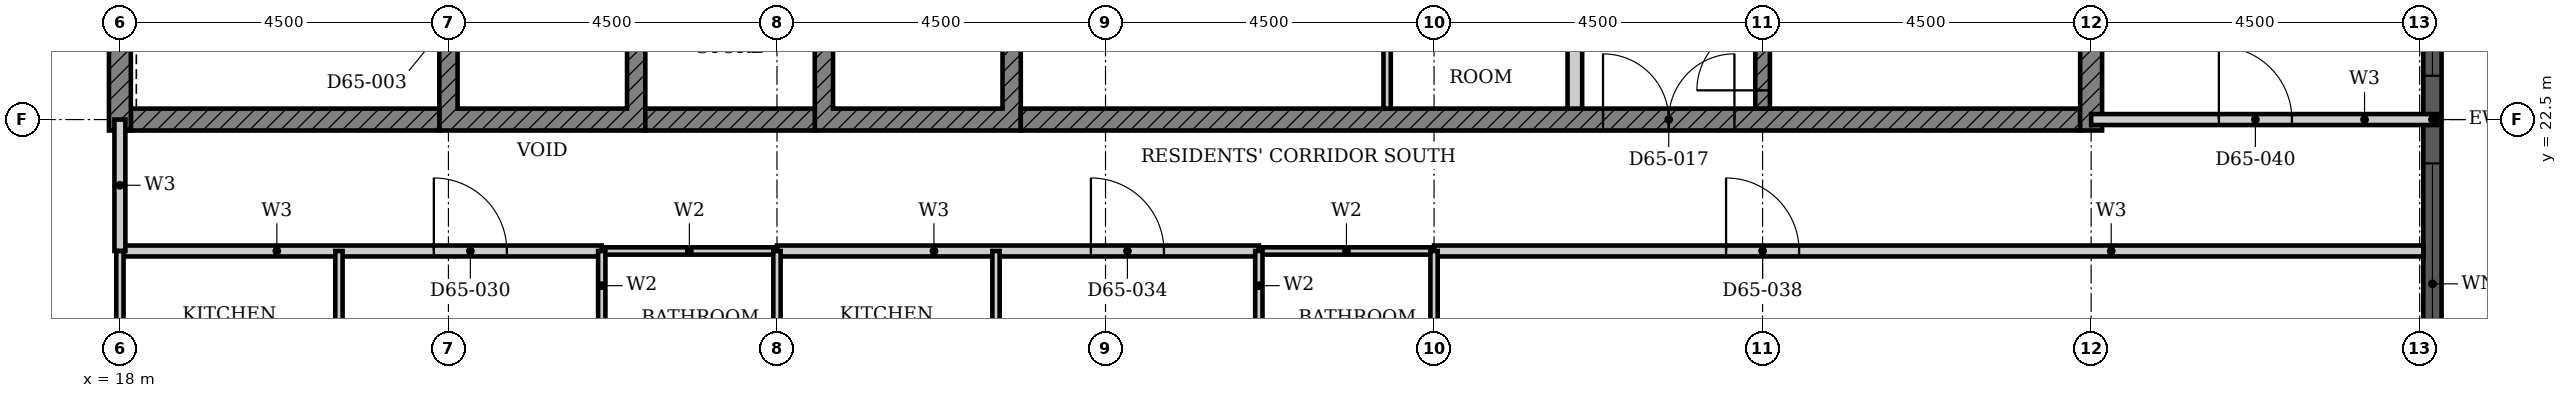
"""IFC4 building model, lengths in metres.
Left out: names, types, materials, properties, quantities, classifications, styles, units other than length and angle.
Written with IfcOpenShell. Run it as: python <this file> out.ifc"""

import sys

from ifc_helpers import new_model, si_unit, direction, frame, frame_2d, origin, place, context, subcontext, project, spatial, polyline, rectangle, outline, extrude, element, fill, save


model = new_model("IFC4")
c1 = context("Model", 3, precision=1e-05, world=origin(), true_north=direction((0.0, 1.0)))
c2 = subcontext(c1, "Body", "Model", "MODEL_VIEW")
j1 = project(units=[si_unit("LENGTHUNIT", "METRE"), si_unit("PLANEANGLEUNIT", "RADIAN")], contexts=[c1])
p1 = place(None, origin())
s1 = spatial("IfcSite", under=j1, at=p1, CompositionType="ELEMENT")
p2 = place(p1, origin())
s2 = spatial("IfcBuilding", under=s1, at=p2, CompositionType="ELEMENT")
p3 = place(p2, frame((0.0, 0.0, 256.4)))
s3 = spatial("IfcBuildingStorey", under=s2, at=p3, CompositionType="ELEMENT", Elevation=256.4)
p4 = place(p3, frame((49.675, 18.3, 0.0), z_axis=(0.0, 0.0, 1.0), x_axis=(0.0, 1.0, 0.0)))
e1 = element("IfcWall", 1, at=p4, inside=s3, PredefinedType="SOLIDWALL", context=c2, shape_type="SweptSolid", body=[
    extrude(rectangle(XDim=8.4, YDim=0.25, at=frame_2d((4.2, 0.0))), origin(), (0.0, 0.0, 1.0), 3.7),
])
p5 = place(p4, frame((0.3, 0.0, 0.45)))
e2 = element("IfcOpeningElement", 2, at=p5, cuts=e1, PredefinedType="OPENING", context=c2, shape_type="SweptSolid", body=[
    extrude(rectangle(XDim=3.3, YDim=2.3, at=frame_2d((1.65, 1.15))), frame((0.0, 0.135, 0.0), z_axis=(0.0, -1.0, 0.0), x_axis=(1.0, 0.0, 0.0)), (0.0, 0.0, 1.0), 0.27),
])
p6 = place(p4, frame((4.8, 0.0, 0.45)))
e3 = element("IfcOpeningElement", 3, at=p6, cuts=e1, PredefinedType="OPENING", context=c2, shape_type="SweptSolid", body=[
    extrude(rectangle(XDim=3.3, YDim=2.3, at=frame_2d((1.65, 1.15))), frame((0.0, 0.135, 0.0), z_axis=(0.0, -1.0, 0.0), x_axis=(1.0, 0.0, 0.0)), (0.0, 0.0, 1.0), 0.27),
])
p7 = place(p3, origin())
e4 = element("IfcWall", 4, at=p7, inside=s3, PredefinedType="SHEAR", context=c2, shape_type="SweptSolid", body=[
    extrude(outline(polyline([(22.375, 22.35), (25.197, 22.35), (25.197, 25.275), (24.947, 25.275), (24.947, 22.65), (22.625, 22.65), (22.625, 25.275), (22.375, 25.275), (22.375, 22.35)])), origin(), (0.0, 0.0, 1.0), 3.4),
])
p8 = place(p3, origin())
e5 = element("IfcWall", 5, at=p8, inside=s3, PredefinedType="SHEAR", context=c2, shape_type="SweptSolid", body=[
    extrude(outline(polyline([(27.518, 22.35), (30.339, 22.35), (30.339, 25.275), (30.089, 25.275), (30.089, 22.65), (27.768, 22.65), (27.768, 25.275), (27.518, 25.275), (27.518, 22.35)])), origin(), (0.0, 0.0, 1.0), 3.4),
])
p9 = place(p3, frame((18.15, 22.5, 0.0), z_axis=(0.0, 0.0, 1.0), x_axis=(1.0, 0.0, 0.0)))
e6 = element("IfcWall", 6, at=p9, inside=s3, PredefinedType="SHEAR", context=c2, shape_type="SweptSolid", body=[
    extrude(rectangle(XDim=4.225, YDim=0.3, at=frame_2d((2.113, 0.0))), origin(), (0.0, 0.0, 1.0), 3.4),
])
p10 = place(p3, frame((25.197, 22.5, 0.0), z_axis=(0.0, 0.0, 1.0), x_axis=(1.0, 0.0, 0.0)))
e7 = element("IfcWall", 7, at=p10, inside=s3, PredefinedType="SHEAR", context=c2, shape_type="SweptSolid", body=[
    extrude(rectangle(XDim=2.321, YDim=0.3, at=frame_2d((1.161, 0.0))), origin(), (0.0, 0.0, 1.0), 3.4),
])
p11 = place(p3, frame((30.339, 22.5, 0.0), z_axis=(0.0, 0.0, 1.0), x_axis=(1.0, 0.0, 0.0)))
e8 = element("IfcWall", 8, at=p11, inside=s3, PredefinedType="SHEAR", context=c2, shape_type="SweptSolid", body=[
    extrude(rectangle(XDim=14.511, YDim=0.3, at=frame_2d((7.255, 0.0))), origin(), (0.0, 0.0, 1.0), 3.4),
])
p12 = place(p11, frame((7.975, 0.0, 0.0)))
e9 = element("IfcOpeningElement", 9, at=p12, cuts=e8, PredefinedType="OPENING", context=c2, shape_type="SweptSolid", body=[
    extrude(rectangle(XDim=1.8, YDim=2.1, at=frame_2d((0.9, 1.05))), frame((0.0, 0.16, 0.0), z_axis=(0.0, -1.0, 0.0), x_axis=(1.0, 0.0, 0.0)), (0.0, 0.0, 1.0), 0.32),
])
for number, where, z_axis, x_axis in (
    (10, (18.0, 22.35, 0.0), (0.0, 0.0, 1.0), (0.0, 1.0, 0.0)),
    (11, (45.0, 22.35, 0.0), (0.0, 0.0, 1.0), (0.0, 1.0, 0.0)),
):
    element("IfcWall", number, at=place(p3, frame(where, z_axis=z_axis, x_axis=x_axis)), inside=s3, PredefinedType="SHEAR", context=c2, shape_type="SweptSolid", body=[
        extrude(rectangle(XDim=9.3, YDim=0.3, at=frame_2d((4.65, 0.0))), origin(), (0.0, 0.0, 1.0), 3.4),
    ])
p13 = place(p3, frame((37.928, 22.65, 0.0), z_axis=(0.0, 0.0, 1.0), x_axis=(0.0, 1.0, 0.0)))
e12 = element("IfcWall", 12, at=p13, inside=s3, PredefinedType="PARTITIONING", context=c2, shape_type="SweptSolid", body=[
    extrude(rectangle(XDim=2.625, YDim=0.2, at=frame_2d((1.312, 0.0))), origin(), (0.0, 0.0, 1.0), 3.4),
])
p14 = place(p3, frame((35.357, 22.65, 0.0), z_axis=(0.0, 0.0, 1.0), x_axis=(0.0, 1.0, 0.0)))
e13 = element("IfcWall", 13, at=p14, inside=s3, PredefinedType="PARTITIONING", context=c2, shape_type="SweptSolid", body=[
    extrude(rectangle(XDim=2.625, YDim=0.1, at=frame_2d((1.312, 0.0))), origin(), (0.0, 0.0, 1.0), 3.4),
])
p15 = place(p3, frame((40.5, 22.65, 0.0), z_axis=(0.0, 0.0, 1.0), x_axis=(0.0, 1.0, 0.0)))
e14 = element("IfcWall", 14, at=p15, inside=s3, PredefinedType="SHEAR", context=c2, shape_type="SweptSolid", body=[
    extrude(rectangle(XDim=5.825, YDim=0.2, at=frame_2d((2.913, 0.0))), origin(), (0.0, 0.0, 1.0), 3.4),
])
p16 = place(p15, frame((0.25, 0.0, 0.0)))
e15 = element("IfcOpeningElement", 15, at=p16, cuts=e14, PredefinedType="OPENING", context=c2, shape_type="SweptSolid", body=[
    extrude(rectangle(XDim=1.8, YDim=2.1, at=frame_2d((0.9, 1.05))), frame((0.0, 0.11, 0.0), z_axis=(0.0, -1.0, 0.0), x_axis=(1.0, 0.0, 0.0)), (0.0, 0.0, 1.0), 0.22),
])
p17 = place(p3, frame((18.0, 20.7, 0.0), z_axis=(0.0, 0.0, 1.0), x_axis=(1.0, 0.0, 0.0)))
e16 = element("IfcWall", 16, at=p17, inside=s3, PredefinedType="PARTITIONING", context=c2, shape_type="SweptSolid", body=[
    extrude(rectangle(XDim=6.6, YDim=0.15, at=frame_2d((3.3, 0.0))), origin(), (0.0, 0.0, 1.0), 3.4),
])
p18 = place(p17, frame((4.3, 0.0, 0.0)))
e17 = element("IfcOpeningElement", 17, at=p18, cuts=e16, PredefinedType="OPENING", context=c2, shape_type="SweptSolid", body=[
    extrude(rectangle(XDim=1.0, YDim=2.2, at=frame_2d((0.5, 1.1))), frame((0.0, 0.085, 0.0), z_axis=(0.0, -1.0, 0.0), x_axis=(1.0, 0.0, 0.0)), (0.0, 0.0, 1.0), 0.17),
])
p19 = place(p3, frame((27.0, 20.7, 0.0), z_axis=(0.0, 0.0, 1.0), x_axis=(1.0, 0.0, 0.0)))
e18 = element("IfcWall", 18, at=p19, inside=s3, PredefinedType="PARTITIONING", context=c2, shape_type="SweptSolid", body=[
    extrude(rectangle(XDim=6.6, YDim=0.15, at=frame_2d((3.3, 0.0))), origin(), (0.0, 0.0, 1.0), 3.4),
])
p20 = place(p19, frame((4.3, 0.0, 0.0)))
e19 = element("IfcOpeningElement", 19, at=p20, cuts=e18, PredefinedType="OPENING", context=c2, shape_type="SweptSolid", body=[
    extrude(rectangle(XDim=1.0, YDim=2.2, at=frame_2d((0.5, 1.1))), frame((0.0, 0.085, 0.0), z_axis=(0.0, -1.0, 0.0), x_axis=(1.0, 0.0, 0.0)), (0.0, 0.0, 1.0), 0.17),
])
p21 = place(p3, frame((36.0, 20.7, 0.0), z_axis=(0.0, 0.0, 1.0), x_axis=(1.0, 0.0, 0.0)))
e20 = element("IfcWall", 20, at=p21, inside=s3, PredefinedType="PARTITIONING", context=c2, shape_type="SweptSolid", body=[
    extrude(rectangle(XDim=13.55, YDim=0.15, at=frame_2d((6.775, 0.0))), origin(), (0.0, 0.0, 1.0), 3.4),
])
p22 = place(p21, frame((4.0, 0.0, 0.0)))
e21 = element("IfcOpeningElement", 21, at=p22, cuts=e20, PredefinedType="OPENING", context=c2, shape_type="SweptSolid", body=[
    extrude(rectangle(XDim=1.0, YDim=2.1, at=frame_2d((0.5, 1.05))), frame((0.0, 0.085, 0.0), z_axis=(0.0, -1.0, 0.0), x_axis=(1.0, 0.0, 0.0)), (0.0, 0.0, 1.0), 0.17),
])
p23 = place(p3, frame((45.0, 22.5, 0.0), z_axis=(0.0, 0.0, 1.0), x_axis=(1.0, 0.0, 0.0)))
e22 = element("IfcWall", 22, at=p23, inside=s3, PredefinedType="PARTITIONING", context=c2, shape_type="SweptSolid", body=[
    extrude(rectangle(XDim=4.74, YDim=0.15, at=frame_2d((2.37, 0.0))), origin(), (0.0, 0.0, 1.0), 3.4),
])
p24 = place(p23, frame((1.75, 0.0, 0.0)))
e23 = element("IfcOpeningElement", 23, at=p24, cuts=e22, PredefinedType="OPENING", context=c2, shape_type="SweptSolid", body=[
    extrude(rectangle(XDim=1.0, YDim=2.1, at=frame_2d((0.5, 1.05))), frame((0.0, 0.085, 0.0), z_axis=(0.0, -1.0, 0.0), x_axis=(1.0, 0.0, 0.0)), (0.0, 0.0, 1.0), 0.17),
])
p25 = place(p3, frame((18.0, 20.7, 0.0), z_axis=(0.0, 0.0, 1.0), x_axis=(0.0, 1.0, 0.0)))
e24 = element("IfcWall", 24, at=p25, inside=s3, PredefinedType="PARTITIONING", context=c2, shape_type="SweptSolid", body=[
    extrude(rectangle(XDim=1.8, YDim=0.15, at=frame_2d((0.9, 0.0))), origin(), (0.0, 0.0, 1.0), 3.4),
])
for number, where, z_axis, x_axis in (
    (25, (18.0, 18.0, 0.0), (0.0, 0.0, 1.0), (0.0, 1.0, 0.0)),
    (26, (21.0, 18.0, 0.0), (0.0, 0.0, 1.0), (0.0, 1.0, 0.0)),
    (27, (30.0, 18.0, 0.0), (0.0, 0.0, 1.0), (0.0, 1.0, 0.0)),
):
    element("IfcWall", number, at=place(p3, frame(where, z_axis=z_axis, x_axis=x_axis)), inside=s3, PredefinedType="PARTITIONING", context=c2, shape_type="SweptSolid", body=[
        extrude(rectangle(XDim=2.7, YDim=0.1, at=frame_2d((1.35, 0.0))), origin(), (0.0, 0.0, 1.0), 3.4),
    ])
for number, where, z_axis, x_axis in (
    (28, (24.6, 20.7, 0.0), (0.0, 0.0, 1.0), (1.0, 0.0, 0.0)),
    (29, (33.6, 20.7, 0.0), (0.0, 0.0, 1.0), (1.0, 0.0, 0.0)),
):
    element("IfcWall", number, at=place(p3, frame(where, z_axis=z_axis, x_axis=x_axis)), inside=s3, PredefinedType="PARTITIONING", context=c2, shape_type="SweptSolid", body=[
        extrude(rectangle(XDim=2.4, YDim=0.1, at=frame_2d((1.2, 0.0))), origin(), (0.0, 0.0, 1.0), 3.4),
    ])
p26 = place(p3, frame((24.6, 18.0, 0.0), z_axis=(0.0, 0.0, 1.0), x_axis=(0.0, 1.0, 0.0)))
e30 = element("IfcWall", 30, at=p26, inside=s3, PredefinedType="PARTITIONING", context=c2, shape_type="SweptSolid", body=[
    extrude(rectangle(XDim=2.7, YDim=0.1, at=frame_2d((1.35, 0.0))), origin(), (0.0, 0.0, 1.0), 3.4),
])
p27 = place(p26, frame((0.95, 0.0, 0.0)))
e31 = element("IfcOpeningElement", 31, at=p27, cuts=e30, PredefinedType="OPENING", context=c2, shape_type="SweptSolid", body=[
    extrude(rectangle(XDim=0.8, YDim=2.1, at=frame_2d((0.4, 1.05))), frame((0.0, 0.06, 0.0), z_axis=(0.0, -1.0, 0.0), x_axis=(1.0, 0.0, 0.0)), (0.0, 0.0, 1.0), 0.12),
])
p28 = place(p3, frame((27.0, 18.0, 0.0), z_axis=(0.0, 0.0, 1.0), x_axis=(0.0, 1.0, 0.0)))
e32 = element("IfcWall", 32, at=p28, inside=s3, PredefinedType="PARTITIONING", context=c2, shape_type="SweptSolid", body=[
    extrude(rectangle(XDim=2.7, YDim=0.1, at=frame_2d((1.35, 0.0))), origin(), (0.0, 0.0, 1.0), 3.4),
])
p29 = place(p3, frame((33.6, 18.0, 0.0), z_axis=(0.0, 0.0, 1.0), x_axis=(0.0, 1.0, 0.0)))
e33 = element("IfcWall", 33, at=p29, inside=s3, PredefinedType="PARTITIONING", context=c2, shape_type="SweptSolid", body=[
    extrude(rectangle(XDim=2.7, YDim=0.1, at=frame_2d((1.35, 0.0))), origin(), (0.0, 0.0, 1.0), 3.4),
])
p30 = place(p29, frame((0.95, 0.0, 0.0)))
e34 = element("IfcOpeningElement", 34, at=p30, cuts=e33, PredefinedType="OPENING", context=c2, shape_type="SweptSolid", body=[
    extrude(rectangle(XDim=0.8, YDim=2.1, at=frame_2d((0.4, 1.05))), frame((0.0, 0.06, 0.0), z_axis=(0.0, -1.0, 0.0), x_axis=(1.0, 0.0, 0.0)), (0.0, 0.0, 1.0), 0.12),
])
p31 = place(p3, frame((36.0, 18.0, 0.0), z_axis=(0.0, 0.0, 1.0), x_axis=(0.0, 1.0, 0.0)))
e35 = element("IfcWall", 35, at=p31, inside=s3, PredefinedType="PARTITIONING", context=c2, shape_type="SweptSolid", body=[
    extrude(rectangle(XDim=2.7, YDim=0.1, at=frame_2d((1.35, 0.0))), origin(), (0.0, 0.0, 1.0), 3.4),
])
p32 = place(p5, origin())
e36 = element("IfcWindow", 36, at=p32, inside=s3, PartitioningType="SINGLE_PANEL", PredefinedType="WINDOW", context=c2, shape_type="SweptSolid", body=[
    extrude(rectangle(XDim=3.3, YDim=2.3, at=frame_2d((1.65, 1.15))), frame((0.0, 0.03, 0.0), z_axis=(0.0, -1.0, 0.0), x_axis=(1.0, 0.0, 0.0)), (0.0, 0.0, 1.0), 0.06),
])
fill(e2, e36)
p33 = place(p6, origin())
e37 = element("IfcWindow", 37, at=p33, inside=s3, PartitioningType="SINGLE_PANEL", PredefinedType="WINDOW", context=c2, shape_type="SweptSolid", body=[
    extrude(rectangle(XDim=3.3, YDim=2.3, at=frame_2d((1.65, 1.15))), frame((0.0, 0.03, 0.0), z_axis=(0.0, -1.0, 0.0), x_axis=(1.0, 0.0, 0.0)), (0.0, 0.0, 1.0), 0.06),
])
fill(e3, e37)
p34 = place(p16, origin())
e38 = element("IfcDoor", 38, at=p34, inside=s3, OperationType="DOUBLE_DOOR_SINGLE_SWING", PredefinedType="DOOR", context=c2, shape_type="SweptSolid", body=[
    extrude(rectangle(XDim=1.8, YDim=2.1, at=frame_2d((0.9, 1.05))), frame((0.0, 0.025, 0.0), z_axis=(0.0, -1.0, 0.0), x_axis=(1.0, 0.0, 0.0)), (0.0, 0.0, 1.0), 0.05),
])
fill(e15, e38)
p35 = place(p12, origin())
e39 = element("IfcDoor", 39, at=p35, inside=s3, OperationType="DOUBLE_DOOR_SINGLE_SWING", PredefinedType="DOOR", context=c2, shape_type="SweptSolid", body=[
    extrude(rectangle(XDim=1.8, YDim=2.1, at=frame_2d((0.9, 1.05))), frame((0.0, 0.025, 0.0), z_axis=(0.0, -1.0, 0.0), x_axis=(1.0, 0.0, 0.0)), (0.0, 0.0, 1.0), 0.05),
])
fill(e9, e39)
p36 = place(p18, origin())
e40 = element("IfcDoor", 40, at=p36, inside=s3, OperationType="SINGLE_SWING_LEFT", PredefinedType="DOOR", context=c2, shape_type="SweptSolid", body=[
    extrude(rectangle(XDim=1.0, YDim=2.2, at=frame_2d((0.5, 1.1))), frame((0.0, 0.025, 0.0), z_axis=(0.0, -1.0, 0.0), x_axis=(1.0, 0.0, 0.0)), (0.0, 0.0, 1.0), 0.05),
])
fill(e17, e40)
p37 = place(p20, origin())
e41 = element("IfcDoor", 41, at=p37, inside=s3, OperationType="SINGLE_SWING_LEFT", PredefinedType="DOOR", context=c2, shape_type="SweptSolid", body=[
    extrude(rectangle(XDim=1.0, YDim=2.2, at=frame_2d((0.5, 1.1))), frame((0.0, 0.025, 0.0), z_axis=(0.0, -1.0, 0.0), x_axis=(1.0, 0.0, 0.0)), (0.0, 0.0, 1.0), 0.05),
])
fill(e19, e41)
p38 = place(p22, origin())
e42 = element("IfcDoor", 42, at=p38, inside=s3, OperationType="SINGLE_SWING_RIGHT", PredefinedType="DOOR", context=c2, shape_type="SweptSolid", body=[
    extrude(rectangle(XDim=1.0, YDim=2.1, at=frame_2d((0.5, 1.05))), frame((0.0, 0.025, 0.0), z_axis=(0.0, -1.0, 0.0), x_axis=(1.0, 0.0, 0.0)), (0.0, 0.0, 1.0), 0.05),
])
fill(e21, e42)
p39 = place(p24, origin())
e43 = element("IfcDoor", 43, at=p39, inside=s3, OperationType="SINGLE_SWING_LEFT", PredefinedType="DOOR", context=c2, shape_type="SweptSolid", body=[
    extrude(rectangle(XDim=1.0, YDim=2.1, at=frame_2d((0.5, 1.05))), frame((0.0, 0.025, 0.0), z_axis=(0.0, -1.0, 0.0), x_axis=(1.0, 0.0, 0.0)), (0.0, 0.0, 1.0), 0.05),
])
fill(e23, e43)
save(model, sys.argv[1])
